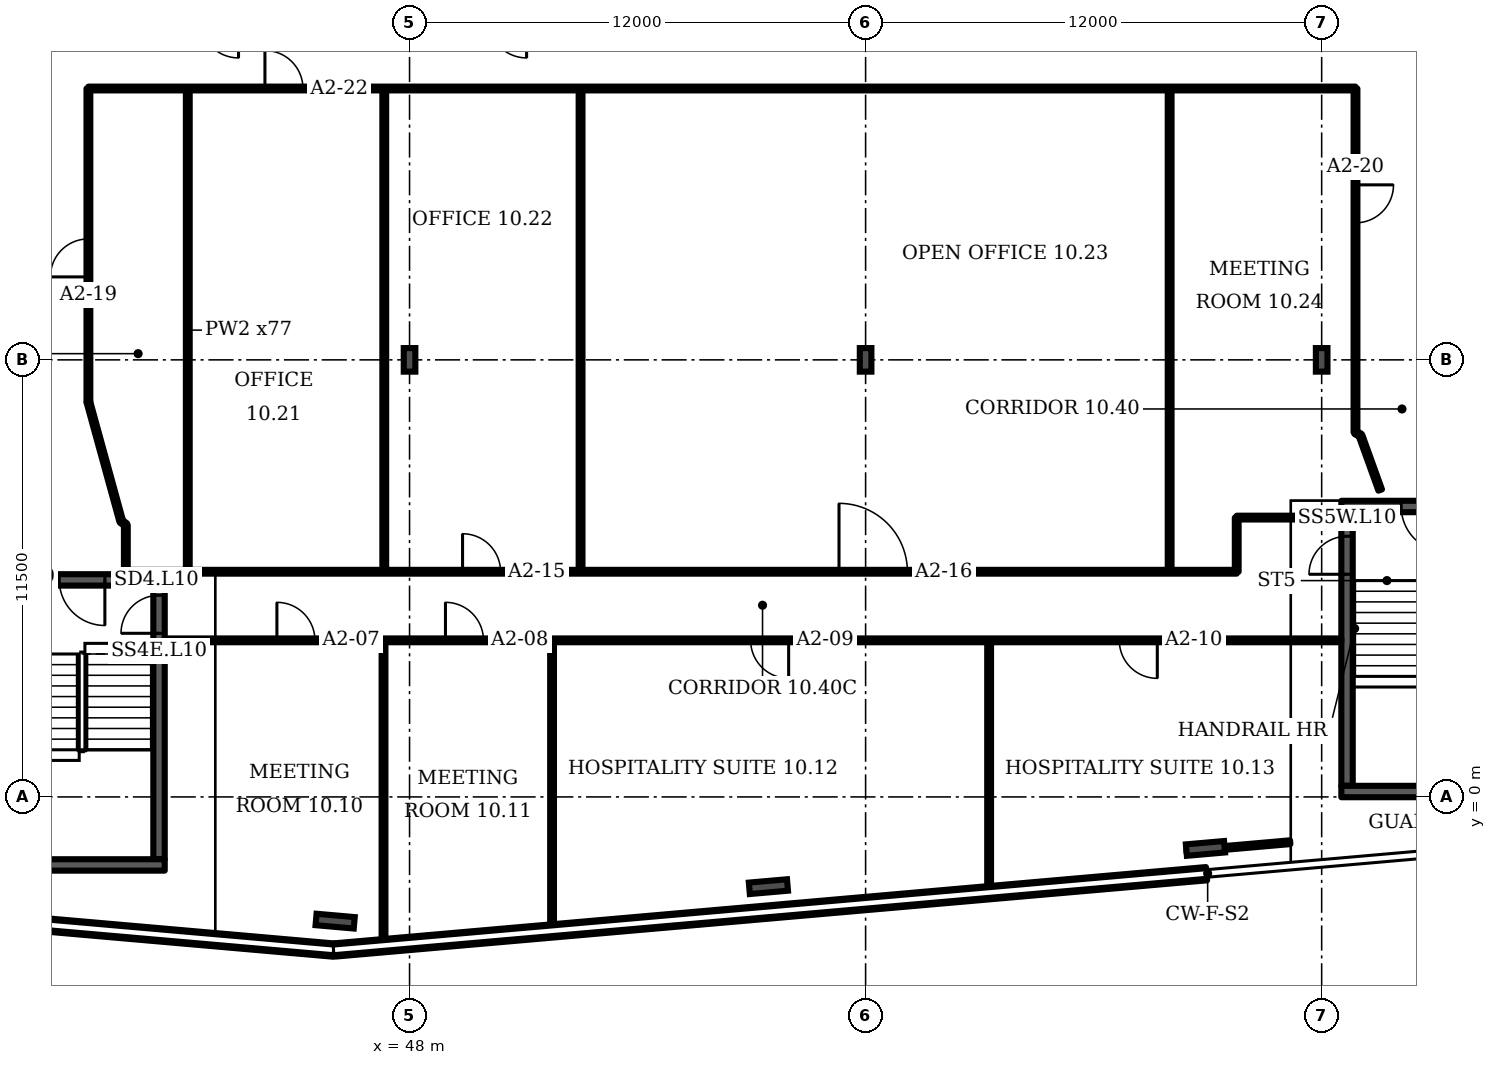
"""IFC4 building model, lengths in metres.
Left out: names, types, materials, properties, quantities, classifications, styles, units other than length and angle.
Written with IfcOpenShell. Run it as: python <this file> out.ifc"""

import sys

from ifc_helpers import new_model, si_unit, direction, frame, frame_2d, origin, origin_2d, place, context, subcontext, project, spatial, rectangle, i_section, extrude, element, fill, save


model = new_model("IFC4")
c1 = context("Model", 3, precision=1e-05, world=origin(), true_north=direction((0.0, 1.0)))
c2 = subcontext(c1, "Body", "Model", "MODEL_VIEW")
j1 = project(units=[si_unit("LENGTHUNIT", "METRE"), si_unit("PLANEANGLEUNIT", "RADIAN")], contexts=[c1])
p1 = place(None, origin())
s1 = spatial("IfcSite", under=j1, at=p1, CompositionType="ELEMENT")
p2 = place(p1, origin())
s2 = spatial("IfcBuilding", under=s1, at=p2, CompositionType="ELEMENT")
p3 = place(p2, frame((0.0, 0.0, 55.9)))
s3 = spatial("IfcBuildingStorey", under=s2, at=p3, CompositionType="ELEMENT", Elevation=55.9)
for number, where, z_axis, x_axis in (
    (1, (46.042, -3.268, 0.0), (0.0, 0.0, 1.0), (-0.087, -0.996, 0.0)),
    (2, (57.442, -2.361, 0.0), (0.0, 0.0, 1.0), (0.087, -0.996, 0.0)),
    (3, (68.942, -1.355, 0.0), (0.0, 0.0, 1.0), (0.087, -0.996, 0.0)),
):
    element("IfcColumn", number, at=place(p3, frame(where, z_axis=z_axis, x_axis=x_axis)), inside=s3, PredefinedType="COLUMN", context=c2, shape_type="SweptSolid", body=[
        extrude(i_section(OverallWidth=0.302, OverallDepth=1.008, WebThickness=0.021, FlangeThickness=0.04, FilletRadius=0.03, at=origin_2d()), origin(), (0.0, 0.0, 1.0), 3.6),
    ])
for number, where, z_axis, x_axis in (
    (4, (48.0, 11.5, 0.0), (0.0, 0.0, 1.0), (1.0, 0.0, 0.0)),
    (5, (60.0, 11.5, 0.0), (0.0, 0.0, 1.0), (1.0, 0.0, 0.0)),
    (6, (72.0, 11.5, 0.0), (0.0, 0.0, 1.0), (1.0, 0.0, 0.0)),
):
    element("IfcColumn", number, at=place(p3, frame(where, z_axis=z_axis, x_axis=x_axis)), inside=s3, PredefinedType="COLUMN", context=c2, shape_type="SweptSolid", body=[
        extrude(i_section(OverallWidth=0.305, OverallDepth=0.62, WebThickness=0.021, FlangeThickness=0.04, FilletRadius=0.027, at=origin_2d()), origin(), (0.0, 0.0, 1.0), 3.6),
    ])
p4 = place(p3, frame((34.601, -3.032, 0.0), z_axis=(0.0, 0.0, 1.0), x_axis=(0.996193, -0.087148, 0.0)))
e7 = element("IfcWall", 7, at=p4, inside=s3, PredefinedType="SOLIDWALL", context=c2, shape_type="SweptSolid", body=[
    extrude(rectangle(XDim=11.458, YDim=0.35, at=frame_2d((5.729, 0.0))), origin(), (0.0, 0.0, 1.0), 1.0),
])
p5 = place(p3, frame((46.045, -4.026, 0.0), z_axis=(0.0, 0.0, 1.0), x_axis=(0.99619, 0.087163, 0.0)))
e8 = element("IfcWall", 8, at=p5, inside=s3, PredefinedType="SOLIDWALL", context=c2, shape_type="SweptSolid", body=[
    extrude(rectangle(XDim=23.013, YDim=0.35, at=frame_2d((11.506, 0.0))), origin(), (0.0, 0.0, 1.0), 1.0),
])
p6 = place(p3, frame((37.208, 5.711, 0.0), z_axis=(0.0, 0.0, 1.0), x_axis=(1.0, 0.0, 0.0)))
e9 = element("IfcWall", 9, at=p6, inside=s3, PredefinedType="SHEAR", context=c2, shape_type="SweptSolid", body=[
    extrude(rectangle(XDim=4.35, YDim=0.3, at=frame_2d((2.175, 0.0))), origin(), (0.0, 0.0, 1.0), 3.2),
])
p7 = place(p6, frame((1.575, 0.0, 0.0)))
e10 = element("IfcOpeningElement", 10, at=p7, cuts=e9, PredefinedType="OPENING", context=c2, shape_type="SweptSolid", body=[
    extrude(rectangle(XDim=1.2, YDim=2.1, at=frame_2d((0.6, 1.05))), frame((0.0, 0.16, 0.0), z_axis=(0.0, -1.0, 0.0), x_axis=(1.0, 0.0, 0.0)), (0.0, 0.0, 1.0), 0.32),
])
p8 = place(p3, frame((41.408, -1.639, 0.0), z_axis=(0.0, 0.0, 1.0), x_axis=(0.0, 1.0, 0.0)))
e11 = element("IfcWall", 11, at=p8, inside=s3, PredefinedType="SHEAR", context=c2, shape_type="SweptSolid", body=[
    extrude(rectangle(XDim=7.2, YDim=0.3, at=frame_2d((3.6, 0.0))), origin(), (0.0, 0.0, 1.0), 3.2),
])
p9 = place(p8, frame((5.945, 0.0, 0.0)))
e12 = element("IfcOpeningElement", 12, at=p9, cuts=e11, PredefinedType="OPENING", context=c2, shape_type="SweptSolid", body=[
    extrude(rectangle(XDim=1.0, YDim=2.1, at=frame_2d((0.5, 1.05))), frame((0.0, 0.16, 0.0), z_axis=(0.0, -1.0, 0.0), x_axis=(1.0, 0.0, 0.0)), (0.0, 0.0, 1.0), 0.32),
])
p10 = place(p3, frame((72.518, 7.642, 0.0), z_axis=(0.0, 0.0, 1.0), x_axis=(1.0, 0.0, 0.0)))
e13 = element("IfcWall", 13, at=p10, inside=s3, PredefinedType="SHEAR", context=c2, shape_type="SweptSolid", body=[
    extrude(rectangle(XDim=4.35, YDim=0.3, at=frame_2d((2.175, 0.0))), origin(), (0.0, 0.0, 1.0), 3.2),
])
p11 = place(p10, frame((1.575, 0.0, 0.0)))
e14 = element("IfcOpeningElement", 14, at=p11, cuts=e13, PredefinedType="OPENING", context=c2, shape_type="SweptSolid", body=[
    extrude(rectangle(XDim=1.2, YDim=2.1, at=frame_2d((0.6, 1.05))), frame((0.0, 0.16, 0.0), z_axis=(0.0, -1.0, 0.0), x_axis=(1.0, 0.0, 0.0)), (0.0, 0.0, 1.0), 0.32),
])
p12 = place(p3, frame((72.667, 0.292, 0.0), z_axis=(0.0, 0.0, 1.0), x_axis=(0.0, 1.0, 0.0)))
e15 = element("IfcWall", 15, at=p12, inside=s3, PredefinedType="SHEAR", context=c2, shape_type="SweptSolid", body=[
    extrude(rectangle(XDim=7.2, YDim=0.3, at=frame_2d((3.6, 0.0))), origin(), (0.0, 0.0, 1.0), 3.2),
])
p13 = place(p12, frame((5.566, 0.0, 0.0)))
e16 = element("IfcOpeningElement", 16, at=p13, cuts=e15, PredefinedType="OPENING", context=c2, shape_type="SweptSolid", body=[
    extrude(rectangle(XDim=1.0, YDim=2.1, at=frame_2d((0.5, 1.05))), frame((0.0, 0.16, 0.0), z_axis=(0.0, -1.0, 0.0), x_axis=(1.0, 0.0, 0.0)), (0.0, 0.0, 1.0), 0.32),
])
p14 = place(p3, frame((39.55, 10.39, 0.0), z_axis=(0.0, 0.0, 1.0), x_axis=(0.0, 1.0, 0.0)))
e17 = element("IfcWall", 17, at=p14, inside=s3, PredefinedType="PARTITIONING", context=c2, shape_type="SweptSolid", body=[
    extrude(rectangle(XDim=8.25, YDim=0.1, at=frame_2d((4.125, 0.0))), origin(), (0.0, 0.0, 1.0), 3.2),
])
p15 = place(p14, frame((3.293, 0.0, 0.0)))
e18 = element("IfcOpeningElement", 18, at=p15, cuts=e17, PredefinedType="OPENING", context=c2, shape_type="SweptSolid", body=[
    extrude(rectangle(XDim=1.0, YDim=2.1, at=frame_2d((0.5, 1.05))), frame((0.0, 0.06, 0.0), z_axis=(0.0, -1.0, 0.0), x_axis=(1.0, 0.0, 0.0)), (0.0, 0.0, 1.0), 0.12),
])
p16 = place(p3, frame((39.55, 18.64, 0.0), z_axis=(0.0, 0.0, 1.0), x_axis=(1.0, 0.0, 0.0)))
e19 = element("IfcWall", 19, at=p16, inside=s3, PredefinedType="PARTITIONING", context=c2, shape_type="SweptSolid", body=[
    extrude(rectangle(XDim=33.34, YDim=0.1, at=frame_2d((16.67, 0.0))), origin(), (0.0, 0.0, 1.0), 3.2),
])
p17 = place(p16, frame((4.645, 0.0, 0.0)))
e20 = element("IfcOpeningElement", 20, at=p17, cuts=e19, PredefinedType="OPENING", context=c2, shape_type="SweptSolid", body=[
    extrude(rectangle(XDim=1.0, YDim=2.1, at=frame_2d((0.5, 1.05))), frame((0.0, 0.06, 0.0), z_axis=(0.0, -1.0, 0.0), x_axis=(1.0, 0.0, 0.0)), (0.0, 0.0, 1.0), 0.12),
])
p18 = place(p3, frame((40.415, 7.25, 0.0), z_axis=(0.0, 0.0, 1.0), x_axis=(-0.26559, 0.964085, 0.0)))
e21 = element("IfcWall", 21, at=p18, inside=s3, PredefinedType="PARTITIONING", context=c2, shape_type="SweptSolid", body=[
    extrude(rectangle(XDim=3.257, YDim=0.1, at=frame_2d((1.628, 0.0))), origin(), (0.0, 0.0, 1.0), 3.2),
])
p19 = place(p3, frame((40.535, 5.925, 0.0), z_axis=(0.0, 0.0, 1.0), x_axis=(0.0, 1.0, 0.0)))
e22 = element("IfcWall", 22, at=p19, inside=s3, PredefinedType="PARTITIONING", context=c2, shape_type="SweptSolid", body=[
    extrude(rectangle(XDim=1.235, YDim=0.1, at=frame_2d((0.617, 0.0))), origin(), (0.0, 0.0, 1.0), 3.2),
])
p20 = place(p3, frame((40.535, 5.925, 0.0), z_axis=(0.0, 0.0, 1.0), x_axis=(1.0, 0.0, 0.0)))
e23 = element("IfcWall", 23, at=p20, inside=s3, PredefinedType="PARTITIONING", context=c2, shape_type="SweptSolid", body=[
    extrude(rectangle(XDim=29.23, YDim=0.1, at=frame_2d((14.615, 0.0))), origin(), (0.0, 0.0, 1.0), 3.2),
])
p21 = place(p20, frame((8.86, 0.0, 0.0)))
e24 = element("IfcOpeningElement", 24, at=p21, cuts=e23, PredefinedType="OPENING", context=c2, shape_type="SweptSolid", body=[
    extrude(rectangle(XDim=1.0, YDim=2.1, at=frame_2d((0.5, 1.05))), frame((0.0, 0.06, 0.0), z_axis=(0.0, -1.0, 0.0), x_axis=(1.0, 0.0, 0.0)), (0.0, 0.0, 1.0), 0.12),
])
p22 = place(p20, frame((18.765, 0.0, 0.0)))
e25 = element("IfcOpeningElement", 25, at=p22, cuts=e23, PredefinedType="OPENING", context=c2, shape_type="SweptSolid", body=[
    extrude(rectangle(XDim=1.8, YDim=2.1, at=frame_2d((0.9, 1.05))), frame((0.0, 0.06, 0.0), z_axis=(0.0, -1.0, 0.0), x_axis=(1.0, 0.0, 0.0)), (0.0, 0.0, 1.0), 0.12),
])
p23 = place(p3, frame((40.535, 7.16, 0.0), z_axis=(0.0, 0.0, 1.0), x_axis=(-0.799412, 0.60078, 0.0)))
e26 = element("IfcWall", 26, at=p23, inside=s3, PredefinedType="PARTITIONING", context=c2, shape_type="SweptSolid", body=[
    extrude(rectangle(XDim=0.15, YDim=0.1, at=frame_2d((0.075, 0.0))), origin(), (0.0, 0.0, 1.0), 3.2),
])
p24 = place(p3, frame((41.558, 4.12, 0.0), z_axis=(0.0, 0.0, 1.0), x_axis=(1.0, 0.0, 0.0)))
e27 = element("IfcWall", 27, at=p24, inside=s3, PredefinedType="PARTITIONING", context=c2, shape_type="SweptSolid", body=[
    extrude(rectangle(XDim=30.959, YDim=0.1, at=frame_2d((15.479, 0.0))), origin(), (0.0, 0.0, 1.0), 3.2),
])
p25 = place(p24, frame((2.952, 0.0, 0.0)))
e28 = element("IfcOpeningElement", 28, at=p25, cuts=e27, PredefinedType="OPENING", context=c2, shape_type="SweptSolid", body=[
    extrude(rectangle(XDim=1.0, YDim=2.1, at=frame_2d((0.5, 1.05))), frame((0.0, 0.06, 0.0), z_axis=(0.0, -1.0, 0.0), x_axis=(1.0, 0.0, 0.0)), (0.0, 0.0, 1.0), 0.12),
])
p26 = place(p24, frame((7.387, 0.0, 0.0)))
e29 = element("IfcOpeningElement", 29, at=p26, cuts=e27, PredefinedType="OPENING", context=c2, shape_type="SweptSolid", body=[
    extrude(rectangle(XDim=1.0, YDim=2.1, at=frame_2d((0.5, 1.05))), frame((0.0, 0.06, 0.0), z_axis=(0.0, -1.0, 0.0), x_axis=(1.0, 0.0, 0.0)), (0.0, 0.0, 1.0), 0.12),
])
p27 = place(p24, frame((15.417, 0.0, 0.0)))
e30 = element("IfcOpeningElement", 30, at=p27, cuts=e27, PredefinedType="OPENING", context=c2, shape_type="SweptSolid", body=[
    extrude(rectangle(XDim=1.0, YDim=2.1, at=frame_2d((0.5, 1.05))), frame((0.0, 0.06, 0.0), z_axis=(0.0, -1.0, 0.0), x_axis=(1.0, 0.0, 0.0)), (0.0, 0.0, 1.0), 0.12),
])
p28 = place(p24, frame((25.117, 0.0, 0.0)))
e31 = element("IfcOpeningElement", 31, at=p28, cuts=e27, PredefinedType="OPENING", context=c2, shape_type="SweptSolid", body=[
    extrude(rectangle(XDim=1.0, YDim=2.1, at=frame_2d((0.5, 1.05))), frame((0.0, 0.06, 0.0), z_axis=(0.0, -1.0, 0.0), x_axis=(1.0, 0.0, 0.0)), (0.0, 0.0, 1.0), 0.12),
])
p29 = place(p3, frame((42.165, 5.925, 0.0), z_axis=(0.0, 0.0, 1.0), x_axis=(0.0, 1.0, 0.0)))
e32 = element("IfcWall", 32, at=p29, inside=s3, PredefinedType="PARTITIONING", context=c2, shape_type="SweptSolid", body=[
    extrude(rectangle(XDim=12.715, YDim=0.1, at=frame_2d((6.357, 0.0))), origin(), (0.0, 0.0, 1.0), 3.2),
])
p30 = place(p3, frame((47.315, -3.889, 0.0), z_axis=(0.0, 0.0, 1.0), x_axis=(0.0, 1.0, 0.0)))
e33 = element("IfcWall", 33, at=p30, inside=s3, PredefinedType="PARTITIONING", context=c2, shape_type="SweptSolid", body=[
    extrude(rectangle(XDim=8.01, YDim=0.1, at=frame_2d((4.005, 0.0))), origin(), (0.0, 0.0, 1.0), 2.58),
])
p31 = place(p3, frame((47.335, 5.925, 0.0), z_axis=(0.0, 0.0, 1.0), x_axis=(0.0, 1.0, 0.0)))
e34 = element("IfcWall", 34, at=p31, inside=s3, PredefinedType="PARTITIONING", context=c2, shape_type="SweptSolid", body=[
    extrude(rectangle(XDim=12.715, YDim=0.1, at=frame_2d((6.357, 0.0))), origin(), (0.0, 0.0, 1.0), 3.2),
])
p32 = place(p3, frame((51.75, -3.501, 0.0), z_axis=(0.0, 0.0, 1.0), x_axis=(0.0, 1.0, 0.0)))
e35 = element("IfcWall", 35, at=p32, inside=s3, PredefinedType="PARTITIONING", context=c2, shape_type="SweptSolid", body=[
    extrude(rectangle(XDim=7.621, YDim=0.1, at=frame_2d((3.811, 0.0))), origin(), (0.0, 0.0, 1.0), 2.58),
])
p33 = place(p3, frame((52.5, 5.93, 0.0), z_axis=(0.0, 0.0, 1.0), x_axis=(0.0, 1.0, 0.0)))
e36 = element("IfcWall", 36, at=p33, inside=s3, PredefinedType="PARTITIONING", context=c2, shape_type="SweptSolid", body=[
    extrude(rectangle(XDim=12.71, YDim=0.1, at=frame_2d((6.355, 0.0))), origin(), (0.0, 0.0, 1.0), 3.2),
])
p34 = place(p3, frame((63.25, -2.495, 0.0), z_axis=(0.0, 0.0, 1.0), x_axis=(0.0, 1.0, 0.0)))
e37 = element("IfcWall", 37, at=p34, inside=s3, PredefinedType="PARTITIONING", context=c2, shape_type="SweptSolid", body=[
    extrude(rectangle(XDim=6.615, YDim=0.1, at=frame_2d((3.308, 0.0))), origin(), (0.0, 0.0, 1.0), 2.58),
])
p35 = place(p3, frame((68.0, 5.925, 0.0), z_axis=(0.0, 0.0, 1.0), x_axis=(0.0, 1.0, 0.0)))
e38 = element("IfcWall", 38, at=p35, inside=s3, PredefinedType="PARTITIONING", context=c2, shape_type="SweptSolid", body=[
    extrude(rectangle(XDim=12.715, YDim=0.1, at=frame_2d((6.357, 0.0))), origin(), (0.0, 0.0, 1.0), 3.2),
])
p36 = place(p3, frame((68.445, -1.43, 0.0), z_axis=(0.0, 0.0, 1.0), x_axis=(0.996195, 0.087118, 0.0)))
e39 = element("IfcWall", 39, at=p36, inside=s3, PredefinedType="PARTITIONING", context=c2, shape_type="SweptSolid", body=[
    extrude(rectangle(XDim=2.738, YDim=0.1, at=frame_2d((1.369, 0.0))), origin(), (0.0, 0.0, 1.0), 2.58),
])
p37 = place(p3, frame((69.765, 5.925, 0.0), z_axis=(0.0, 0.0, 1.0), x_axis=(0.0, 1.0, 0.0)))
e40 = element("IfcWall", 40, at=p37, inside=s3, PredefinedType="PARTITIONING", context=c2, shape_type="SweptSolid", body=[
    extrude(rectangle(XDim=1.425, YDim=0.1, at=frame_2d((0.712, 0.0))), origin(), (0.0, 0.0, 1.0), 3.2),
])
p38 = place(p3, frame((69.765, 7.35, 0.0), z_axis=(0.0, 0.0, 1.0), x_axis=(1.0, 0.0, 0.0)))
e41 = element("IfcWall", 41, at=p38, inside=s3, PredefinedType="PARTITIONING", context=c2, shape_type="SweptSolid", body=[
    extrude(rectangle(XDim=2.753, YDim=0.1, at=frame_2d((1.376, 0.0))), origin(), (0.0, 0.0, 1.0), 3.2),
])
p39 = place(p3, frame((72.89, 9.59, 0.0), z_axis=(0.0, 0.0, 1.0), x_axis=(0.0, 1.0, 0.0)))
e42 = element("IfcWall", 42, at=p39, inside=s3, PredefinedType="PARTITIONING", context=c2, shape_type="SweptSolid", body=[
    extrude(rectangle(XDim=9.05, YDim=0.1, at=frame_2d((4.525, 0.0))), origin(), (0.0, 0.0, 1.0), 3.2),
])
p40 = place(p39, frame((5.515, 0.0, 0.0)))
e43 = element("IfcOpeningElement", 43, at=p40, cuts=e42, PredefinedType="OPENING", context=c2, shape_type="SweptSolid", body=[
    extrude(rectangle(XDim=1.0, YDim=2.1, at=frame_2d((0.5, 1.05))), frame((0.0, 0.06, 0.0), z_axis=(0.0, -1.0, 0.0), x_axis=(1.0, 0.0, 0.0)), (0.0, 0.0, 1.0), 0.12),
])
p41 = place(p3, frame((73.02, 9.515, 0.0), z_axis=(0.0, 0.0, 1.0), x_axis=(-0.865836, 0.500333, 0.0)))
e44 = element("IfcWall", 44, at=p41, inside=s3, PredefinedType="PARTITIONING", context=c2, shape_type="SweptSolid", body=[
    extrude(rectangle(XDim=0.15, YDim=0.1, at=frame_2d((0.075, 0.0))), origin(), (0.0, 0.0, 1.0), 3.2),
])
p42 = place(p3, frame((73.54, 8.075, 0.0), z_axis=(0.0, 0.0, 1.0), x_axis=(-0.339669, 0.940548, 0.0)))
e45 = element("IfcWall", 45, at=p42, inside=s3, PredefinedType="PARTITIONING", context=c2, shape_type="SweptSolid", body=[
    extrude(rectangle(XDim=1.531, YDim=0.1, at=frame_2d((0.766, 0.0))), origin(), (0.0, 0.0, 1.0), 3.2),
])
p43 = place(p3, frame((72.817, 7.354, 0.0), z_axis=(0.0, 0.0, 1.0), x_axis=(0.999994, 0.002027, 0.0)))
e46 = element("IfcWall", 46, at=p43, inside=s3, PredefinedType="PARTITIONING", context=c2, shape_type="SweptSolid", body=[
    extrude(rectangle(XDim=0.723, YDim=0.1, at=frame_2d((0.361, 0.0))), origin(), (0.0, 0.0, 1.0), 3.2),
])
p44 = place(p3, frame((37.208, -1.789, 0.0), z_axis=(0.0, 0.0, 1.0), x_axis=(1.0, 0.0, 0.0)))
e47 = element("IfcWall", 47, at=p44, inside=s3, PredefinedType="SHEAR", context=c2, shape_type="SweptSolid", body=[
    extrude(rectangle(XDim=4.35, YDim=0.3, at=frame_2d((2.175, 0.0))), origin(), (0.0, 0.0, 1.0), 3.2),
])
p45 = place(p3, frame((72.518, 0.142, 0.0), z_axis=(0.0, 0.0, 1.0), x_axis=(1.0, 0.0, 0.0)))
e48 = element("IfcWall", 48, at=p45, inside=s3, PredefinedType="SHEAR", context=c2, shape_type="SweptSolid", body=[
    extrude(rectangle(XDim=4.05, YDim=0.3, at=frame_2d((2.025, 0.0))), origin(), (0.0, 0.0, 1.0), 3.2),
])
p46 = place(p9, origin())
e49 = element("IfcDoor", 49, at=p46, inside=s3, OperationType="SINGLE_SWING_LEFT", PredefinedType="DOOR", context=c2, shape_type="SweptSolid", body=[
    extrude(rectangle(XDim=1.0, YDim=2.1, at=frame_2d((0.5, 1.05))), frame((0.0, 0.025, 0.0), z_axis=(0.0, -1.0, 0.0), x_axis=(1.0, 0.0, 0.0)), (0.0, 0.0, 1.0), 0.05),
])
fill(e12, e49)
p47 = place(p7, origin())
e50 = element("IfcDoor", 50, at=p47, inside=s3, OperationType="SINGLE_SWING_RIGHT", PredefinedType="DOOR", context=c2, shape_type="SweptSolid", body=[
    extrude(rectangle(XDim=1.2, YDim=2.1, at=frame_2d((0.6, 1.05))), frame((0.0, 0.025, 0.0), z_axis=(0.0, -1.0, 0.0), x_axis=(1.0, 0.0, 0.0)), (0.0, 0.0, 1.0), 0.05),
])
fill(e10, e50)
p48 = place(p13, origin())
e51 = element("IfcDoor", 51, at=p48, inside=s3, OperationType="SINGLE_SWING_LEFT", PredefinedType="DOOR", context=c2, shape_type="SweptSolid", body=[
    extrude(rectangle(XDim=1.0, YDim=2.1, at=frame_2d((0.5, 1.05))), frame((0.0, 0.025, 0.0), z_axis=(0.0, -1.0, 0.0), x_axis=(1.0, 0.0, 0.0)), (0.0, 0.0, 1.0), 0.05),
])
fill(e16, e51)
p49 = place(p11, origin())
e52 = element("IfcDoor", 52, at=p49, inside=s3, OperationType="SINGLE_SWING_RIGHT", PredefinedType="DOOR", context=c2, shape_type="SweptSolid", body=[
    extrude(rectangle(XDim=1.2, YDim=2.1, at=frame_2d((0.6, 1.05))), frame((0.0, 0.025, 0.0), z_axis=(0.0, -1.0, 0.0), x_axis=(1.0, 0.0, 0.0)), (0.0, 0.0, 1.0), 0.05),
])
fill(e14, e52)
p50 = place(p25, origin())
e53 = element("IfcDoor", 53, at=p50, inside=s3, OperationType="SINGLE_SWING_LEFT", PredefinedType="DOOR", context=c2, shape_type="SweptSolid", body=[
    extrude(rectangle(XDim=1.0, YDim=2.1, at=frame_2d((0.5, 1.05))), frame((0.0, 0.025, 0.0), z_axis=(0.0, -1.0, 0.0), x_axis=(1.0, 0.0, 0.0)), (0.0, 0.0, 1.0), 0.05),
])
fill(e28, e53)
p51 = place(p26, origin())
e54 = element("IfcDoor", 54, at=p51, inside=s3, OperationType="SINGLE_SWING_LEFT", PredefinedType="DOOR", context=c2, shape_type="SweptSolid", body=[
    extrude(rectangle(XDim=1.0, YDim=2.1, at=frame_2d((0.5, 1.05))), frame((0.0, 0.025, 0.0), z_axis=(0.0, -1.0, 0.0), x_axis=(1.0, 0.0, 0.0)), (0.0, 0.0, 1.0), 0.05),
])
fill(e29, e54)
p52 = place(p27, origin())
e55 = element("IfcDoor", 55, at=p52, inside=s3, OperationType="SINGLE_SWING_RIGHT", PredefinedType="DOOR", context=c2, shape_type="SweptSolid", body=[
    extrude(rectangle(XDim=1.0, YDim=2.1, at=frame_2d((0.5, 1.05))), frame((0.0, 0.025, 0.0), z_axis=(0.0, -1.0, 0.0), x_axis=(1.0, 0.0, 0.0)), (0.0, 0.0, 1.0), 0.05),
])
fill(e30, e55)
p53 = place(p28, origin())
e56 = element("IfcDoor", 56, at=p53, inside=s3, OperationType="SINGLE_SWING_RIGHT", PredefinedType="DOOR", context=c2, shape_type="SweptSolid", body=[
    extrude(rectangle(XDim=1.0, YDim=2.1, at=frame_2d((0.5, 1.05))), frame((0.0, 0.025, 0.0), z_axis=(0.0, -1.0, 0.0), x_axis=(1.0, 0.0, 0.0)), (0.0, 0.0, 1.0), 0.05),
])
fill(e31, e56)
p54 = place(p21, origin())
e57 = element("IfcDoor", 57, at=p54, inside=s3, OperationType="SINGLE_SWING_LEFT", PredefinedType="DOOR", context=c2, shape_type="SweptSolid", body=[
    extrude(rectangle(XDim=1.0, YDim=2.1, at=frame_2d((0.5, 1.05))), frame((0.0, 0.025, 0.0), z_axis=(0.0, -1.0, 0.0), x_axis=(1.0, 0.0, 0.0)), (0.0, 0.0, 1.0), 0.05),
])
fill(e24, e57)
p55 = place(p22, origin())
e58 = element("IfcDoor", 58, at=p55, inside=s3, OperationType="DOUBLE_DOOR_SINGLE_SWING", PredefinedType="DOOR", context=c2, shape_type="SweptSolid", body=[
    extrude(rectangle(XDim=1.8, YDim=2.1, at=frame_2d((0.9, 1.05))), frame((0.0, 0.025, 0.0), z_axis=(0.0, -1.0, 0.0), x_axis=(1.0, 0.0, 0.0)), (0.0, 0.0, 1.0), 0.05),
])
fill(e25, e58)
p56 = place(p15, origin())
e59 = element("IfcDoor", 59, at=p56, inside=s3, OperationType="SINGLE_SWING_LEFT", PredefinedType="DOOR", context=c2, shape_type="SweptSolid", body=[
    extrude(rectangle(XDim=1.0, YDim=2.1, at=frame_2d((0.5, 1.05))), frame((0.0, 0.025, 0.0), z_axis=(0.0, -1.0, 0.0), x_axis=(1.0, 0.0, 0.0)), (0.0, 0.0, 1.0), 0.05),
])
fill(e18, e59)
p57 = place(p40, origin())
e60 = element("IfcDoor", 60, at=p57, inside=s3, OperationType="SINGLE_SWING_RIGHT", PredefinedType="DOOR", context=c2, shape_type="SweptSolid", body=[
    extrude(rectangle(XDim=1.0, YDim=2.1, at=frame_2d((0.5, 1.05))), frame((0.0, 0.025, 0.0), z_axis=(0.0, -1.0, 0.0), x_axis=(1.0, 0.0, 0.0)), (0.0, 0.0, 1.0), 0.05),
])
fill(e43, e60)
p58 = place(p17, origin())
e61 = element("IfcDoor", 61, at=p58, inside=s3, OperationType="SINGLE_SWING_LEFT", PredefinedType="DOOR", context=c2, shape_type="SweptSolid", body=[
    extrude(rectangle(XDim=1.0, YDim=2.1, at=frame_2d((0.5, 1.05))), frame((0.0, 0.025, 0.0), z_axis=(0.0, -1.0, 0.0), x_axis=(1.0, 0.0, 0.0)), (0.0, 0.0, 1.0), 0.05),
])
fill(e20, e61)
save(model, sys.argv[1])
